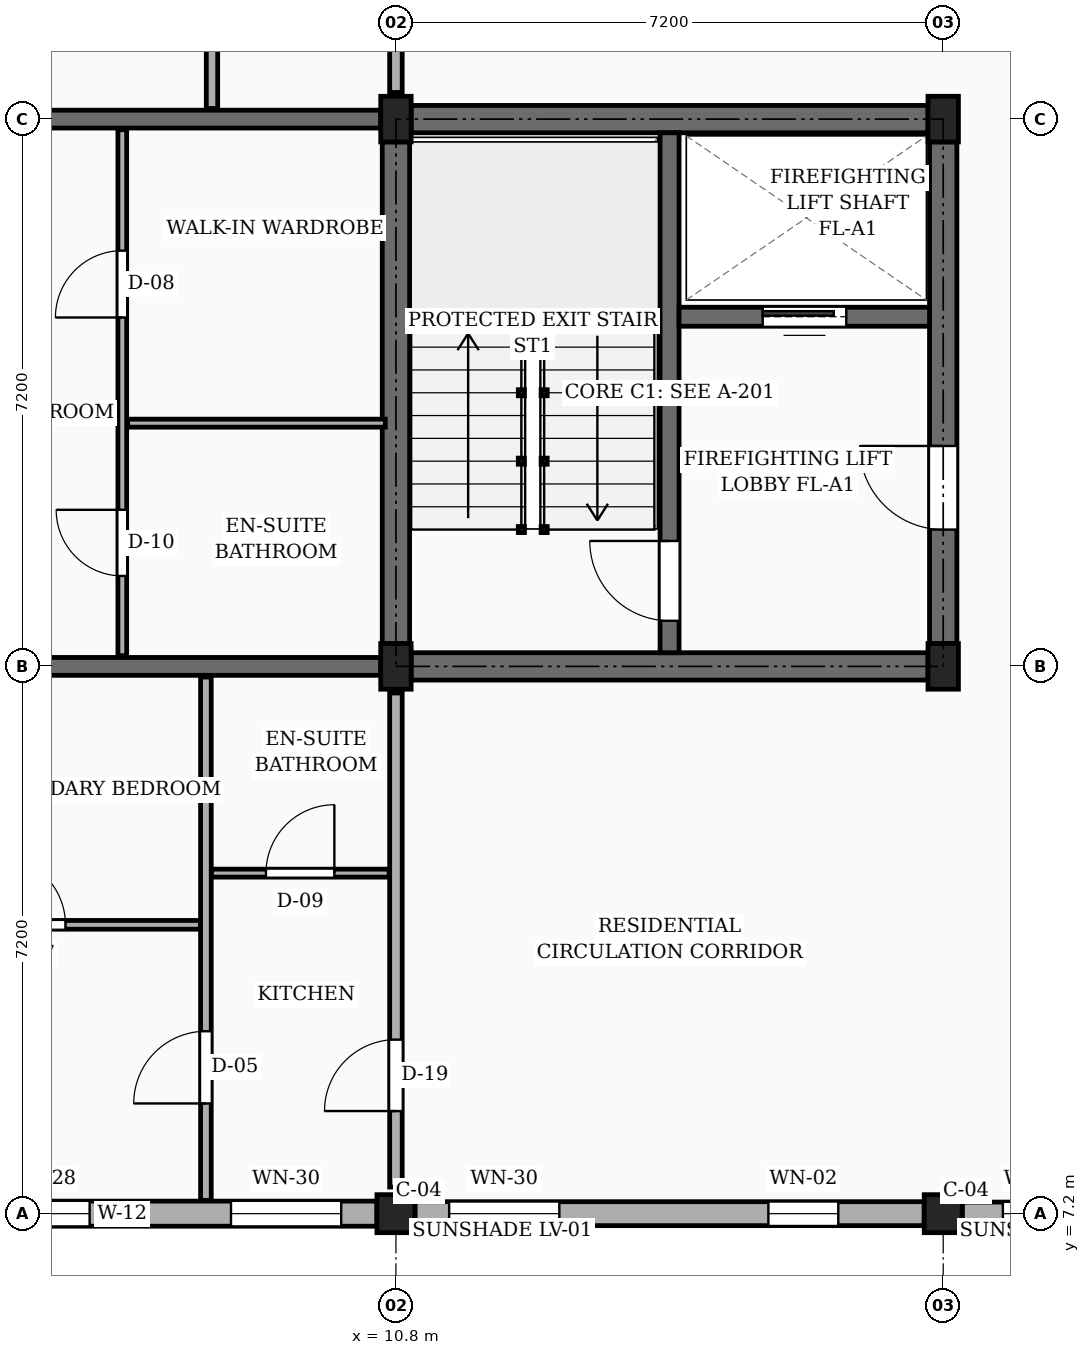
"""IFC4 building model, lengths in metres.
Left out: names, types, materials, properties, quantities, classifications, styles, units other than length and angle.
Written with IfcOpenShell. Run it as: python <this file> out.ifc"""

import sys

from ifc_helpers import new_model, si_unit, direction, frame, frame_2d, origin, origin_2d, place, context, subcontext, project, spatial, rectangle, extrude, element, fill, save


model = new_model("IFC4")
c1 = context("Model", 3, precision=1e-05, world=origin(), true_north=direction((0.0, 1.0)))
c2 = subcontext(c1, "Body", "Model", "MODEL_VIEW")
j1 = project(units=[si_unit("LENGTHUNIT", "METRE"), si_unit("PLANEANGLEUNIT", "RADIAN")], contexts=[c1])
p1 = place(None, origin())
s1 = spatial("IfcSite", under=j1, at=p1, CompositionType="ELEMENT")
p2 = place(p1, origin())
s2 = spatial("IfcBuilding", under=s1, at=p2, CompositionType="ELEMENT")
p3 = place(p2, frame((0.0, 0.0, 23.4)))
s3 = spatial("IfcBuildingStorey", under=s2, at=p3, CompositionType="ELEMENT", Elevation=23.4)
p4 = place(p3, frame((10.8, 7.2, 0.0), z_axis=(0.0, 0.0, 1.0), x_axis=(1.0, 0.0, 0.0)))
e1 = element("IfcColumn", 1, at=p4, inside=s3, PredefinedType="COLUMN", context=c2, shape_type="SweptSolid", body=[
    extrude(rectangle(XDim=0.5, YDim=0.5, at=origin_2d()), origin(), (0.0, 0.0, 1.0), 3.15),
])
for number, where, z_axis, x_axis in (
    (2, (10.8, 14.4, 0.0), (0.0, 0.0, 1.0), (1.0, 0.0, 0.0)),
    (3, (10.8, 21.6, 0.0), (0.0, 0.0, 1.0), (1.0, 0.0, 0.0)),
):
    element("IfcColumn", number, at=place(p3, frame(where, z_axis=z_axis, x_axis=x_axis)), inside=s3, PredefinedType="COLUMN", context=c2, shape_type="SweptSolid", body=[
        extrude(rectangle(XDim=0.4, YDim=0.6, at=origin_2d()), origin(), (0.0, 0.0, 1.0), 3.15),
    ])
p5 = place(p3, frame((18.0, 7.2, 0.0), z_axis=(0.0, 0.0, 1.0), x_axis=(1.0, 0.0, 0.0)))
e4 = element("IfcColumn", 4, at=p5, inside=s3, PredefinedType="COLUMN", context=c2, shape_type="SweptSolid", body=[
    extrude(rectangle(XDim=0.5, YDim=0.5, at=origin_2d()), origin(), (0.0, 0.0, 1.0), 3.15),
])
for number, where, z_axis, x_axis in (
    (5, (18.0, 14.4, 0.0), (0.0, 0.0, 1.0), (1.0, 0.0, 0.0)),
    (6, (18.0, 21.6, 0.0), (0.0, 0.0, 1.0), (1.0, 0.0, 0.0)),
):
    element("IfcColumn", number, at=place(p3, frame(where, z_axis=z_axis, x_axis=x_axis)), inside=s3, PredefinedType="COLUMN", context=c2, shape_type="SweptSolid", body=[
        extrude(rectangle(XDim=0.4, YDim=0.6, at=origin_2d()), origin(), (0.0, 0.0, 1.0), 3.15),
    ])
p6 = place(p3, frame((3.85, 14.4, 0.0), z_axis=(0.0, 0.0, 1.0), x_axis=(1.0, 0.0, 0.0)))
e7 = element("IfcWall", 7, at=p6, inside=s3, PredefinedType="SOLIDWALL", context=c2, shape_type="SweptSolid", body=[
    extrude(rectangle(XDim=6.75, YDim=0.235, at=frame_2d((3.375, 0.0))), origin(), (0.0, 0.0, 1.0), 2.17),
])
p7 = place(p6, frame((1.35, 0.0, 0.0)))
e8 = element("IfcOpeningElement", 8, at=p7, cuts=e7, PredefinedType="OPENING", context=c2, shape_type="SweptSolid", body=[
    extrude(rectangle(XDim=0.98, YDim=2.12, at=frame_2d((0.49, 1.06))), frame((0.0, 0.127, 0.0), z_axis=(0.0, -1.0, 0.0), x_axis=(1.0, 0.0, 0.0)), (0.0, 0.0, 1.0), 0.255),
])
p8 = place(p3, frame((3.85, 21.6, 0.0), z_axis=(0.0, 0.0, 1.0), x_axis=(1.0, 0.0, 0.0)))
e9 = element("IfcWall", 9, at=p8, inside=s3, PredefinedType="SOLIDWALL", context=c2, shape_type="SweptSolid", body=[
    extrude(rectangle(XDim=6.75, YDim=0.235, at=frame_2d((3.375, 0.0))), origin(), (0.0, 0.0, 1.0), 2.17),
])
p9 = place(p3, frame((3.85, 7.2, 0.0), z_axis=(0.0, 0.0, 1.0), x_axis=(1.0, 0.0, 0.0)))
e10 = element("IfcWall", 10, at=p9, inside=s3, PredefinedType="SOLIDWALL", context=c2, shape_type="SweptSolid", body=[
    extrude(rectangle(XDim=6.7, YDim=0.33, at=frame_2d((3.35, 0.0))), origin(), (0.0, 0.0, 1.0), 2.44),
])
p10 = place(p9, frame((1.67, 0.0, 0.78)))
e11 = element("IfcOpeningElement", 11, at=p10, cuts=e10, PredefinedType="OPENING", context=c2, shape_type="SweptSolid", body=[
    extrude(rectangle(XDim=1.25, YDim=1.44, at=frame_2d((0.625, 0.72))), frame((0.0, 0.175, 0.0), z_axis=(0.0, -1.0, 0.0), x_axis=(1.0, 0.0, 0.0)), (0.0, 0.0, 1.0), 0.35),
])
p11 = place(p9, frame((4.78, 0.0, 0.78)))
e12 = element("IfcOpeningElement", 12, at=p11, cuts=e10, PredefinedType="OPENING", context=c2, shape_type="SweptSolid", body=[
    extrude(rectangle(XDim=1.45, YDim=1.44, at=frame_2d((0.725, 0.72))), frame((0.0, 0.175, 0.0), z_axis=(0.0, -1.0, 0.0), x_axis=(1.0, 0.0, 0.0)), (0.0, 0.0, 1.0), 0.35),
])
p12 = place(p3, frame((11.05, 7.2, 0.0), z_axis=(0.0, 0.0, 1.0), x_axis=(1.0, 0.0, 0.0)))
e13 = element("IfcWall", 13, at=p12, inside=s3, PredefinedType="SOLIDWALL", context=c2, shape_type="SweptSolid", body=[
    extrude(rectangle(XDim=6.7, YDim=0.315, at=frame_2d((3.35, 0.0))), origin(), (0.0, 0.0, 1.0), 2.44),
])
p13 = place(p12, frame((0.45, 0.0, 0.78)))
e14 = element("IfcOpeningElement", 14, at=p13, cuts=e13, PredefinedType="OPENING", context=c2, shape_type="SweptSolid", body=[
    extrude(rectangle(XDim=1.45, YDim=1.44, at=frame_2d((0.725, 0.72))), frame((0.0, 0.167, 0.0), z_axis=(0.0, -1.0, 0.0), x_axis=(1.0, 0.0, 0.0)), (0.0, 0.0, 1.0), 0.335),
])
p14 = place(p12, frame((4.65, 0.0, 0.78)))
e15 = element("IfcOpeningElement", 15, at=p14, cuts=e13, PredefinedType="OPENING", context=c2, shape_type="SweptSolid", body=[
    extrude(rectangle(XDim=0.92, YDim=1.15, at=frame_2d((0.46, 0.575))), frame((0.0, 0.167, 0.0), z_axis=(0.0, -1.0, 0.0), x_axis=(1.0, 0.0, 0.0)), (0.0, 0.0, 1.0), 0.335),
])
p15 = place(p3, frame((18.25, 7.2, 0.0), z_axis=(0.0, 0.0, 1.0), x_axis=(1.0, 0.0, 0.0)))
e16 = element("IfcWall", 16, at=p15, inside=s3, PredefinedType="SOLIDWALL", context=c2, shape_type="SweptSolid", body=[
    extrude(rectangle(XDim=6.7, YDim=0.305, at=frame_2d((3.35, 0.0))), origin(), (0.0, 0.0, 1.0), 2.44),
])
p16 = place(p15, frame((0.535, 0.0, 0.78)))
e17 = element("IfcOpeningElement", 17, at=p16, cuts=e16, PredefinedType="OPENING", context=c2, shape_type="SweptSolid", body=[
    extrude(rectangle(XDim=0.92, YDim=1.15, at=frame_2d((0.46, 0.575))), frame((0.0, 0.163, 0.0), z_axis=(0.0, -1.0, 0.0), x_axis=(1.0, 0.0, 0.0)), (0.0, 0.0, 1.0), 0.325),
])
p17 = place(p15, frame((2.84, 0.0, 0.78)))
e18 = element("IfcOpeningElement", 18, at=p17, cuts=e16, PredefinedType="OPENING", context=c2, shape_type="SweptSolid", body=[
    extrude(rectangle(XDim=1.08, YDim=1.15, at=frame_2d((0.54, 0.575))), frame((0.0, 0.163, 0.0), z_axis=(0.0, -1.0, 0.0), x_axis=(1.0, 0.0, 0.0)), (0.0, 0.0, 1.0), 0.325),
])
p18 = place(p15, frame((5.215, 0.0, 0.78)))
e19 = element("IfcOpeningElement", 19, at=p18, cuts=e16, PredefinedType="OPENING", context=c2, shape_type="SweptSolid", body=[
    extrude(rectangle(XDim=1.04, YDim=1.26, at=frame_2d((0.52, 0.63))), frame((0.0, 0.163, 0.0), z_axis=(0.0, -1.0, 0.0), x_axis=(1.0, 0.0, 0.0)), (0.0, 0.0, 1.0), 0.325),
])
p19 = place(p3, frame((10.8, 14.7, 0.0), z_axis=(0.0, 0.0, 1.0), x_axis=(0.0, 1.0, 0.0)))
e20 = element("IfcWall", 20, at=p19, inside=s3, PredefinedType="SHEAR", context=c2, shape_type="SweptSolid", body=[
    extrude(rectangle(XDim=6.6, YDim=0.36, at=frame_2d((3.3, 0.0))), origin(), (0.0, 0.0, 1.0), 2.87),
])
p20 = place(p3, frame((11.0, 21.6, 0.0), z_axis=(0.0, 0.0, 1.0), x_axis=(1.0, 0.0, 0.0)))
e21 = element("IfcWall", 21, at=p20, inside=s3, PredefinedType="SHEAR", context=c2, shape_type="SweptSolid", body=[
    extrude(rectangle(XDim=6.8, YDim=0.36, at=frame_2d((3.4, 0.0))), origin(), (0.0, 0.0, 1.0), 2.87),
])
p21 = place(p3, frame((18.0, 14.7, 0.0), z_axis=(0.0, 0.0, 1.0), x_axis=(0.0, 1.0, 0.0)))
e22 = element("IfcWall", 22, at=p21, inside=s3, PredefinedType="SHEAR", context=c2, shape_type="SweptSolid", body=[
    extrude(rectangle(XDim=6.6, YDim=0.36, at=frame_2d((3.3, 0.0))), origin(), (0.0, 0.0, 1.0), 2.87),
])
p22 = place(p21, frame((1.5, 0.0, 0.0)))
e23 = element("IfcOpeningElement", 23, at=p22, cuts=e22, PredefinedType="OPENING", context=c2, shape_type="SweptSolid", body=[
    extrude(rectangle(XDim=1.1, YDim=2.15, at=frame_2d((0.55, 1.075))), frame((0.0, 0.19, 0.0), z_axis=(0.0, -1.0, 0.0), x_axis=(1.0, 0.0, 0.0)), (0.0, 0.0, 1.0), 0.38),
])
p23 = place(p3, frame((11.0, 14.4, 0.0), z_axis=(0.0, 0.0, 1.0), x_axis=(1.0, 0.0, 0.0)))
e24 = element("IfcWall", 24, at=p23, inside=s3, PredefinedType="SHEAR", context=c2, shape_type="SweptSolid", body=[
    extrude(rectangle(XDim=6.8, YDim=0.36, at=frame_2d((3.4, 0.0))), origin(), (0.0, 0.0, 1.0), 2.87),
])
p24 = place(p3, frame((14.4, 14.58, 0.0), z_axis=(0.0, 0.0, 1.0), x_axis=(0.0, 1.0, 0.0)))
e25 = element("IfcWall", 25, at=p24, inside=s3, PredefinedType="SHEAR", context=c2, shape_type="SweptSolid", body=[
    extrude(rectangle(XDim=6.84, YDim=0.25, at=frame_2d((3.42, 0.0))), origin(), (0.0, 0.0, 1.0), 2.87),
])
p25 = place(p24, frame((0.42, 0.0, 0.0)))
e26 = element("IfcOpeningElement", 26, at=p25, cuts=e25, PredefinedType="OPENING", context=c2, shape_type="SweptSolid", body=[
    extrude(rectangle(XDim=1.05, YDim=2.15, at=frame_2d((0.525, 1.075))), frame((0.0, 0.135, 0.0), z_axis=(0.0, -1.0, 0.0), x_axis=(1.0, 0.0, 0.0)), (0.0, 0.0, 1.0), 0.27),
])
p26 = place(p3, frame((14.525, 19.0, 0.0), z_axis=(0.0, 0.0, 1.0), x_axis=(1.0, 0.0, 0.0)))
e27 = element("IfcWall", 27, at=p26, inside=s3, PredefinedType="SHEAR", context=c2, shape_type="SweptSolid", body=[
    extrude(rectangle(XDim=3.295, YDim=0.25, at=frame_2d((1.647, 0.0))), origin(), (0.0, 0.0, 1.0), 2.87),
])
p27 = place(p26, frame((1.1, 0.0, 0.0)))
e28 = element("IfcOpeningElement", 28, at=p27, cuts=e27, PredefinedType="OPENING", context=c2, shape_type="SweptSolid", body=[
    extrude(rectangle(XDim=1.1, YDim=2.2, at=frame_2d((0.55, 1.1))), frame((0.0, 0.135, 0.0), z_axis=(0.0, -1.0, 0.0), x_axis=(1.0, 0.0, 0.0)), (0.0, 0.0, 1.0), 0.27),
])
p28 = place(p3, frame((10.8, 7.55, 0.0), z_axis=(0.0, 0.0, 1.0), x_axis=(0.0, 1.0, 0.0)))
e29 = element("IfcWall", 29, at=p28, inside=s3, PredefinedType="PARTITIONING", context=c2, shape_type="SweptSolid", body=[
    extrude(rectangle(XDim=6.5, YDim=0.165, at=frame_2d((3.25, 0.0))), origin(), (0.0, 0.0, 1.0), 2.305),
])
p29 = place(p28, frame((1.0, 0.0, 0.0)))
e30 = element("IfcOpeningElement", 30, at=p29, cuts=e29, PredefinedType="OPENING", context=c2, shape_type="SweptSolid", body=[
    extrude(rectangle(XDim=0.94, YDim=2.12, at=frame_2d((0.47, 1.06))), frame((0.0, 0.093, 0.0), z_axis=(0.0, -1.0, 0.0), x_axis=(1.0, 0.0, 0.0)), (0.0, 0.0, 1.0), 0.185),
])
p30 = place(p3, frame((10.8, 21.95, 0.0), z_axis=(0.0, 0.0, 1.0), x_axis=(0.0, 1.0, 0.0)))
e31 = element("IfcWall", 31, at=p30, inside=s3, PredefinedType="PARTITIONING", context=c2, shape_type="SweptSolid", body=[
    extrude(rectangle(XDim=6.5, YDim=0.165, at=frame_2d((3.25, 0.0))), origin(), (0.0, 0.0, 1.0), 2.305),
])
p31 = place(p30, frame((1.0, 0.0, 0.0)))
e32 = element("IfcOpeningElement", 32, at=p31, cuts=e31, PredefinedType="OPENING", context=c2, shape_type="SweptSolid", body=[
    extrude(rectangle(XDim=1.14, YDim=2.18, at=frame_2d((0.57, 1.09))), frame((0.0, 0.093, 0.0), z_axis=(0.0, -1.0, 0.0), x_axis=(1.0, 0.0, 0.0)), (0.0, 0.0, 1.0), 0.185),
])
p32 = place(p3, frame((3.775, 11.0, 0.0), z_axis=(0.0, 0.0, 1.0), x_axis=(1.0, 0.0, 0.0)))
e33 = element("IfcWall", 33, at=p32, inside=s3, PredefinedType="PARTITIONING", context=c2, shape_type="SweptSolid", body=[
    extrude(rectangle(XDim=4.455, YDim=0.115, at=frame_2d((2.228, 0.0))), origin(), (0.0, 0.0, 1.0), 2.305),
])
p33 = place(p32, frame((1.778, 0.0, 0.0)))
e34 = element("IfcOpeningElement", 34, at=p33, cuts=e33, PredefinedType="OPENING", context=c2, shape_type="SweptSolid", body=[
    extrude(rectangle(XDim=0.9, YDim=2.1, at=frame_2d((0.45, 1.05))), frame((0.0, 0.067, 0.0), z_axis=(0.0, -1.0, 0.0), x_axis=(1.0, 0.0, 0.0)), (0.0, 0.0, 1.0), 0.135),
])
p34 = place(p3, frame((8.37, 11.68, 0.0), z_axis=(0.0, 0.0, 1.0), x_axis=(1.0, 0.0, 0.0)))
e35 = element("IfcWall", 35, at=p34, inside=s3, PredefinedType="PARTITIONING", context=c2, shape_type="SweptSolid", body=[
    extrude(rectangle(XDim=2.34, YDim=0.105, at=frame_2d((1.17, 0.0))), origin(), (0.0, 0.0, 1.0), 2.305),
])
p35 = place(p34, frame((0.72, 0.0, 0.0)))
e36 = element("IfcOpeningElement", 36, at=p35, cuts=e35, PredefinedType="OPENING", context=c2, shape_type="SweptSolid", body=[
    extrude(rectangle(XDim=0.9, YDim=2.05, at=frame_2d((0.45, 1.025))), frame((0.0, 0.062, 0.0), z_axis=(0.0, -1.0, 0.0), x_axis=(1.0, 0.0, 0.0)), (0.0, 0.0, 1.0), 0.125),
])
p36 = place(p3, frame((8.3, 7.375, 0.0), z_axis=(0.0, 0.0, 1.0), x_axis=(0.0, 1.0, 0.0)))
e37 = element("IfcWall", 37, at=p36, inside=s3, PredefinedType="PARTITIONING", context=c2, shape_type="SweptSolid", body=[
    extrude(rectangle(XDim=6.885, YDim=0.14, at=frame_2d((3.442, 0.0))), origin(), (0.0, 0.0, 1.0), 2.305),
])
p37 = place(p36, frame((1.275, 0.0, 0.0)))
e38 = element("IfcOpeningElement", 38, at=p37, cuts=e37, PredefinedType="OPENING", context=c2, shape_type="SweptSolid", body=[
    extrude(rectangle(XDim=0.95, YDim=2.1, at=frame_2d((0.475, 1.05))), frame((0.0, 0.08, 0.0), z_axis=(0.0, -1.0, 0.0), x_axis=(1.0, 0.0, 0.0)), (0.0, 0.0, 1.0), 0.16),
])
p38 = place(p3, frame((7.2, 14.54, 0.0), z_axis=(0.0, 0.0, 1.0), x_axis=(0.0, 1.0, 0.0)))
e39 = element("IfcWall", 39, at=p38, inside=s3, PredefinedType="PARTITIONING", context=c2, shape_type="SweptSolid", body=[
    extrude(rectangle(XDim=6.92, YDim=0.115, at=frame_2d((3.46, 0.0))), origin(), (0.0, 0.0, 1.0), 2.305),
])
p39 = place(p38, frame((1.05, 0.0, 0.0)))
e40 = element("IfcOpeningElement", 40, at=p39, cuts=e39, PredefinedType="OPENING", context=c2, shape_type="SweptSolid", body=[
    extrude(rectangle(XDim=0.87, YDim=2.05, at=frame_2d((0.435, 1.025))), frame((0.0, 0.067, 0.0), z_axis=(0.0, -1.0, 0.0), x_axis=(1.0, 0.0, 0.0)), (0.0, 0.0, 1.0), 0.135),
])
p40 = place(p38, frame((4.45, 0.0, 0.0)))
e41 = element("IfcOpeningElement", 41, at=p40, cuts=e39, PredefinedType="OPENING", context=c2, shape_type="SweptSolid", body=[
    extrude(rectangle(XDim=0.88, YDim=2.08, at=frame_2d((0.44, 1.04))), frame((0.0, 0.067, 0.0), z_axis=(0.0, -1.0, 0.0), x_axis=(1.0, 0.0, 0.0)), (0.0, 0.0, 1.0), 0.135),
])
p41 = place(p3, frame((7.27, 17.6, 0.0), z_axis=(0.0, 0.0, 1.0), x_axis=(1.0, 0.0, 0.0)))
e42 = element("IfcWall", 42, at=p41, inside=s3, PredefinedType="PARTITIONING", context=c2, shape_type="SweptSolid", body=[
    extrude(rectangle(XDim=3.39, YDim=0.105, at=frame_2d((1.695, 0.0))), origin(), (0.0, 0.0, 1.0), 2.305),
])
p42 = place(p3, frame((8.38, 21.74, 0.0), z_axis=(0.0, 0.0, 1.0), x_axis=(0.0, 1.0, 0.0)))
e43 = element("IfcWall", 43, at=p42, inside=s3, PredefinedType="PARTITIONING", context=c2, shape_type="SweptSolid", body=[
    extrude(rectangle(XDim=6.92, YDim=0.15, at=frame_2d((3.46, 0.0))), origin(), (0.0, 0.0, 1.0), 2.305),
])
p43 = place(p42, frame((1.31, 0.0, 0.0)))
e44 = element("IfcOpeningElement", 44, at=p43, cuts=e43, PredefinedType="OPENING", context=c2, shape_type="SweptSolid", body=[
    extrude(rectangle(XDim=0.92, YDim=2.1, at=frame_2d((0.46, 1.05))), frame((0.0, 0.085, 0.0), z_axis=(0.0, -1.0, 0.0), x_axis=(1.0, 0.0, 0.0)), (0.0, 0.0, 1.0), 0.17),
])
p44 = place(p10, origin())
e45 = element("IfcWindow", 45, at=p44, inside=s3, PartitioningType="SINGLE_PANEL", PredefinedType="WINDOW", context=c2, shape_type="SweptSolid", body=[
    extrude(rectangle(XDim=1.25, YDim=1.44, at=frame_2d((0.625, 0.72))), frame((0.0, 0.03, 0.0), z_axis=(0.0, -1.0, 0.0), x_axis=(1.0, 0.0, 0.0)), (0.0, 0.0, 1.0), 0.06),
])
fill(e11, e45)
p45 = place(p11, origin())
e46 = element("IfcWindow", 46, at=p45, inside=s3, PartitioningType="SINGLE_PANEL", PredefinedType="WINDOW", context=c2, shape_type="SweptSolid", body=[
    extrude(rectangle(XDim=1.45, YDim=1.44, at=frame_2d((0.725, 0.72))), frame((0.0, 0.03, 0.0), z_axis=(0.0, -1.0, 0.0), x_axis=(1.0, 0.0, 0.0)), (0.0, 0.0, 1.0), 0.06),
])
fill(e12, e46)
p46 = place(p13, origin())
e47 = element("IfcWindow", 47, at=p46, inside=s3, PartitioningType="SINGLE_PANEL", PredefinedType="WINDOW", context=c2, shape_type="SweptSolid", body=[
    extrude(rectangle(XDim=1.45, YDim=1.44, at=frame_2d((0.725, 0.72))), frame((0.0, 0.03, 0.0), z_axis=(0.0, -1.0, 0.0), x_axis=(1.0, 0.0, 0.0)), (0.0, 0.0, 1.0), 0.06),
])
fill(e14, e47)
p47 = place(p14, origin())
e48 = element("IfcWindow", 48, at=p47, inside=s3, PartitioningType="SINGLE_PANEL", PredefinedType="WINDOW", context=c2, shape_type="SweptSolid", body=[
    extrude(rectangle(XDim=0.92, YDim=1.15, at=frame_2d((0.46, 0.575))), frame((0.0, 0.03, 0.0), z_axis=(0.0, -1.0, 0.0), x_axis=(1.0, 0.0, 0.0)), (0.0, 0.0, 1.0), 0.06),
])
fill(e15, e48)
p48 = place(p16, origin())
e49 = element("IfcWindow", 49, at=p48, inside=s3, PartitioningType="SINGLE_PANEL", PredefinedType="WINDOW", context=c2, shape_type="SweptSolid", body=[
    extrude(rectangle(XDim=0.92, YDim=1.15, at=frame_2d((0.46, 0.575))), frame((0.0, 0.03, 0.0), z_axis=(0.0, -1.0, 0.0), x_axis=(1.0, 0.0, 0.0)), (0.0, 0.0, 1.0), 0.06),
])
fill(e17, e49)
p49 = place(p22, frame((1.1, 0.0, 0.0), z_axis=(0.0, 0.0, 1.0), x_axis=(-1.0, 0.0, 0.0)))
e50 = element("IfcDoor", 50, at=p49, inside=s3, OperationType="SINGLE_SWING_RIGHT", PredefinedType="DOOR", context=c2, shape_type="SweptSolid", body=[
    extrude(rectangle(XDim=1.1, YDim=2.15, at=frame_2d((0.55, 1.075))), frame((0.0, 0.025, 0.0), z_axis=(0.0, -1.0, 0.0), x_axis=(1.0, 0.0, 0.0)), (0.0, 0.0, 1.0), 0.05),
])
fill(e23, e50)
p50 = place(p25, origin())
e51 = element("IfcDoor", 51, at=p50, inside=s3, OperationType="SINGLE_SWING_RIGHT", PredefinedType="DOOR", context=c2, shape_type="SweptSolid", body=[
    extrude(rectangle(XDim=1.05, YDim=2.15, at=frame_2d((0.525, 1.075))), frame((0.0, 0.025, 0.0), z_axis=(0.0, -1.0, 0.0), x_axis=(1.0, 0.0, 0.0)), (0.0, 0.0, 1.0), 0.05),
])
fill(e26, e51)
p51 = place(p27, origin())
e52 = element("IfcDoor", 52, at=p51, inside=s3, OperationType="SLIDING_TO_LEFT", PredefinedType="DOOR", context=c2, shape_type="SweptSolid", body=[
    extrude(rectangle(XDim=1.1, YDim=2.2, at=frame_2d((0.55, 1.1))), frame((0.0, 0.025, 0.0), z_axis=(0.0, -1.0, 0.0), x_axis=(1.0, 0.0, 0.0)), (0.0, 0.0, 1.0), 0.05),
])
fill(e28, e52)
p52 = place(p29, origin())
e53 = element("IfcDoor", 53, at=p52, inside=s3, OperationType="SINGLE_SWING_LEFT", PredefinedType="DOOR", context=c2, shape_type="SweptSolid", body=[
    extrude(rectangle(XDim=0.94, YDim=2.12, at=frame_2d((0.47, 1.06))), frame((0.0, 0.025, 0.0), z_axis=(0.0, -1.0, 0.0), x_axis=(1.0, 0.0, 0.0)), (0.0, 0.0, 1.0), 0.05),
])
fill(e30, e53)
p53 = place(p33, origin())
e54 = element("IfcDoor", 54, at=p53, inside=s3, OperationType="SINGLE_SWING_LEFT", PredefinedType="DOOR", context=c2, shape_type="SweptSolid", body=[
    extrude(rectangle(XDim=0.9, YDim=2.1, at=frame_2d((0.45, 1.05))), frame((0.0, 0.025, 0.0), z_axis=(0.0, -1.0, 0.0), x_axis=(1.0, 0.0, 0.0)), (0.0, 0.0, 1.0), 0.05),
])
fill(e34, e54)
p54 = place(p35, origin())
e55 = element("IfcDoor", 55, at=p54, inside=s3, OperationType="SINGLE_SWING_RIGHT", PredefinedType="DOOR", context=c2, shape_type="SweptSolid", body=[
    extrude(rectangle(XDim=0.9, YDim=2.05, at=frame_2d((0.45, 1.025))), frame((0.0, 0.025, 0.0), z_axis=(0.0, -1.0, 0.0), x_axis=(1.0, 0.0, 0.0)), (0.0, 0.0, 1.0), 0.05),
])
fill(e36, e55)
p55 = place(p37, origin())
e56 = element("IfcDoor", 56, at=p55, inside=s3, OperationType="SINGLE_SWING_LEFT", PredefinedType="DOOR", context=c2, shape_type="SweptSolid", body=[
    extrude(rectangle(XDim=0.95, YDim=2.1, at=frame_2d((0.475, 1.05))), frame((0.0, 0.025, 0.0), z_axis=(0.0, -1.0, 0.0), x_axis=(1.0, 0.0, 0.0)), (0.0, 0.0, 1.0), 0.05),
])
fill(e38, e56)
p56 = place(p39, origin())
e57 = element("IfcDoor", 57, at=p56, inside=s3, OperationType="SINGLE_SWING_RIGHT", PredefinedType="DOOR", context=c2, shape_type="SweptSolid", body=[
    extrude(rectangle(XDim=0.87, YDim=2.05, at=frame_2d((0.435, 1.025))), frame((0.0, 0.025, 0.0), z_axis=(0.0, -1.0, 0.0), x_axis=(1.0, 0.0, 0.0)), (0.0, 0.0, 1.0), 0.05),
])
fill(e40, e57)
p57 = place(p40, origin())
e58 = element("IfcDoor", 58, at=p57, inside=s3, OperationType="SINGLE_SWING_LEFT", PredefinedType="DOOR", context=c2, shape_type="SweptSolid", body=[
    extrude(rectangle(XDim=0.88, YDim=2.08, at=frame_2d((0.44, 1.04))), frame((0.0, 0.025, 0.0), z_axis=(0.0, -1.0, 0.0), x_axis=(1.0, 0.0, 0.0)), (0.0, 0.0, 1.0), 0.05),
])
fill(e41, e58)
save(model, sys.argv[1])
